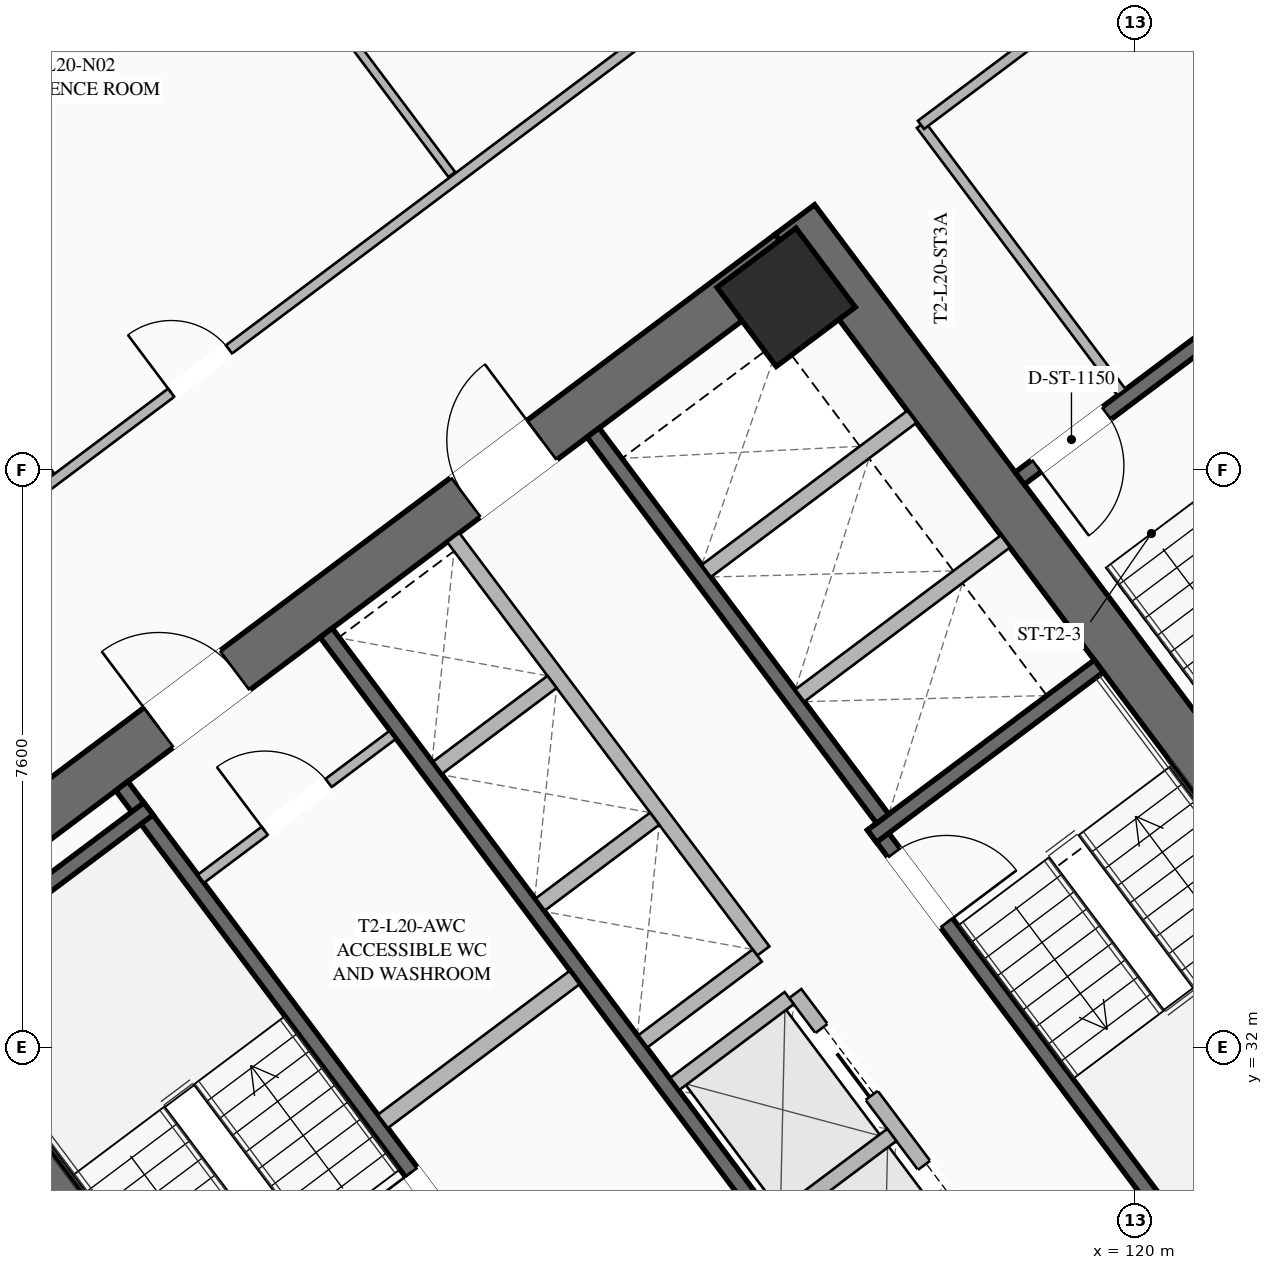
"""IFC4 building model, lengths in metres.
Left out: names, types, materials, properties, quantities, classifications, styles, units other than length and angle.
Written with IfcOpenShell. Run it as: python <this file> out.ifc"""

import sys

from ifc_helpers import new_model, si_unit, direction, frame, frame_2d, origin, origin_2d, place, context, subcontext, project, spatial, rectangle, hollow_rectangle, extrude, element, fill, save


model = new_model("IFC4")
c1 = context("Model", 3, precision=1e-05, world=origin(), true_north=direction((0.0, 1.0)))
c2 = subcontext(c1, "Body", "Model", "MODEL_VIEW")
j1 = project(units=[si_unit("LENGTHUNIT", "METRE"), si_unit("PLANEANGLEUNIT", "RADIAN")], contexts=[c1])
p1 = place(None, origin())
s1 = spatial("IfcSite", under=j1, at=p1, CompositionType="ELEMENT")
p2 = place(p1, origin())
s2 = spatial("IfcBuilding", under=s1, at=p2, CompositionType="ELEMENT")
p3 = place(p2, frame((0.0, 0.0, 77.85)))
s3 = spatial("IfcBuildingStorey", under=s2, at=p3, CompositionType="ELEMENT", Elevation=77.85)
for number, where, z_axis, x_axis in (
    (1, (112.476, 21.107, 0.0), (0.0, 0.0, 1.0), (-0.6, 0.8, 0.0)),
    (2, (115.524, 42.893, 0.0), (0.0, 0.0, 1.0), (0.6, -0.8, 0.0)),
):
    element("IfcWall", number, at=place(p3, frame(where, z_axis=z_axis, x_axis=x_axis)), inside=s3, PredefinedType="SHEAR", context=c2, shape_type="SweptSolid", body=[
        extrude(rectangle(XDim=15.6, YDim=0.65, at=frame_2d((7.8, 0.0))), origin(), (0.0, 0.0, 1.0), 3.55),
    ])
p4 = place(p3, frame((124.429, 30.478, 0.0), z_axis=(0.0, 0.0, 1.0), x_axis=(-0.799998028465, -0.600002628705, 0.0)))
e3 = element("IfcWall", 3, at=p4, inside=s3, PredefinedType="SHEAR", context=c2, shape_type="SweptSolid", body=[
    extrude(rectangle(XDim=14.86, YDim=0.65, at=frame_2d((7.43, 0.0))), origin(), (0.0, 0.0, 1.0), 3.55),
])
p5 = place(p4, frame((9.13, 0.0, 0.0)))
e4 = element("IfcOpeningElement", 4, at=p5, cuts=e3, PredefinedType="OPENING", context=c2, shape_type="SweptSolid", body=[
    extrude(rectangle(XDim=1.25, YDim=2.25, at=frame_2d((0.625, 1.125))), frame((0.0, 0.335, 0.0), z_axis=(0.0, -1.0, 0.0), x_axis=(1.0, 0.0, 0.0)), (0.0, 0.0, 1.0), 0.67),
])
p6 = place(p4, frame((4.08, 0.0, 0.0)))
e5 = element("IfcOpeningElement", 5, at=p6, cuts=e3, PredefinedType="OPENING", context=c2, shape_type="SweptSolid", body=[
    extrude(rectangle(XDim=1.25, YDim=2.25, at=frame_2d((0.625, 1.125))), frame((0.0, 0.335, 0.0), z_axis=(0.0, -1.0, 0.0), x_axis=(1.0, 0.0, 0.0)), (0.0, 0.0, 1.0), 0.67),
])
p7 = place(p3, frame((103.571, 33.522, 0.0), z_axis=(0.0, 0.0, 1.0), x_axis=(0.799998028465, 0.600002628705, 0.0)))
e6 = element("IfcWall", 6, at=p7, inside=s3, PredefinedType="SHEAR", context=c2, shape_type="SweptSolid", body=[
    extrude(rectangle(XDim=14.86, YDim=0.65, at=frame_2d((7.43, 0.0))), origin(), (0.0, 0.0, 1.0), 3.55),
])
p8 = place(p7, frame((4.48, 0.0, 0.0)))
e7 = element("IfcOpeningElement", 7, at=p8, cuts=e6, PredefinedType="OPENING", context=c2, shape_type="SweptSolid", body=[
    extrude(rectangle(XDim=1.25, YDim=2.25, at=frame_2d((0.625, 1.125))), frame((0.0, 0.335, 0.0), z_axis=(0.0, -1.0, 0.0), x_axis=(1.0, 0.0, 0.0)), (0.0, 0.0, 1.0), 0.67),
])
p9 = place(p7, frame((9.53, 0.0, 0.0)))
e8 = element("IfcOpeningElement", 8, at=p9, cuts=e6, PredefinedType="OPENING", context=c2, shape_type="SweptSolid", body=[
    extrude(rectangle(XDim=1.25, YDim=2.25, at=frame_2d((0.625, 1.125))), frame((0.0, 0.335, 0.0), z_axis=(0.0, -1.0, 0.0), x_axis=(1.0, 0.0, 0.0)), (0.0, 0.0, 1.0), 0.67),
])
p10 = place(p3, frame((115.41, 41.87, 0.0), z_axis=(0.0, 0.0, 1.0), x_axis=(0.799999996291, 0.600000004945, 0.0)))
e9 = element("IfcColumn", 9, at=p10, inside=s3, PredefinedType="COLUMN", context=c2, shape_type="SweptSolid", body=[
    extrude(hollow_rectangle(XDim=1.3, YDim=1.3, WallThickness=0.05, at=origin_2d()), origin(), (0.0, 0.0, 1.0), 3.35),
])
p11 = place(p3, frame((111.44, 29.08, 0.0), z_axis=(0.0, 0.0, 1.0), x_axis=(-0.600009827119, 0.799992629566, 0.0)))
e10 = element("IfcWall", 10, at=p11, inside=s3, PredefinedType="SHEAR", context=c2, shape_type="SweptSolid", body=[
    extrude(rectangle(XDim=7.95, YDim=0.2, at=frame_2d((3.975, 0.0))), origin(), (0.0, 0.0, 1.0), 3.35),
])
p12 = place(p11, frame((0.45, 0.0, 0.0)))
e11 = element("IfcOpeningElement", 11, at=p12, cuts=e10, PredefinedType="OPENING", context=c2, shape_type="SweptSolid", body=[
    extrude(rectangle(XDim=1.15, YDim=2.2, at=frame_2d((0.575, 1.1))), frame((0.0, 0.11, 0.0), z_axis=(0.0, -1.0, 0.0), x_axis=(1.0, 0.0, 0.0)), (0.0, 0.0, 1.0), 0.22),
])
p13 = place(p3, frame((104.036, 32.902, 0.0), z_axis=(0.0, 0.0, 1.0), x_axis=(0.800039270442, 0.59994763584, 0.0)))
e12 = element("IfcWall", 12, at=p13, inside=s3, PredefinedType="SHEAR", context=c2, shape_type="SweptSolid", body=[
    extrude(rectangle(XDim=3.73, YDim=0.2, at=frame_2d((1.865, 0.0))), origin(), (0.0, 0.0, 1.0), 3.35),
])
p14 = place(p3, frame((116.56, 34.92, 0.0), z_axis=(0.0, 0.0, 1.0), x_axis=(0.600009827119, -0.799992629566, 0.0)))
e13 = element("IfcWall", 13, at=p14, inside=s3, PredefinedType="SHEAR", context=c2, shape_type="SweptSolid", body=[
    extrude(rectangle(XDim=7.95, YDim=0.2, at=frame_2d((3.975, 0.0))), origin(), (0.0, 0.0, 1.0), 3.35),
])
p15 = place(p14, frame((0.45, 0.0, 0.0)))
e14 = element("IfcOpeningElement", 14, at=p15, cuts=e13, PredefinedType="OPENING", context=c2, shape_type="SweptSolid", body=[
    extrude(rectangle(XDim=1.15, YDim=2.2, at=frame_2d((0.575, 1.1))), frame((0.0, 0.11, 0.0), z_axis=(0.0, -1.0, 0.0), x_axis=(1.0, 0.0, 0.0)), (0.0, 0.0, 1.0), 0.22),
])
p16 = place(p3, frame((116.54, 34.78, 0.0), z_axis=(0.0, 0.0, 1.0), x_axis=(0.799984290658, 0.600020945218, 0.0)))
e15 = element("IfcWall", 15, at=p16, inside=s3, PredefinedType="SHEAR", context=c2, shape_type="SweptSolid", body=[
    extrude(rectangle(XDim=3.73, YDim=0.2, at=frame_2d((1.865, 0.0))), origin(), (0.0, 0.0, 1.0), 3.35),
])
p17 = place(p3, frame((117.938, 26.016, 0.0), z_axis=(0.0, 0.0, 1.0), x_axis=(-0.600005463273, 0.799995902516, 0.0)))
e16 = element("IfcWall", 16, at=p17, inside=s3, PredefinedType="SHEAR", context=c2, shape_type="SweptSolid", body=[
    extrude(rectangle(XDim=14.3, YDim=0.2, at=frame_2d((7.15, 0.0))), origin(), (0.0, 0.0, 1.0), 3.35),
])
p18 = place(p3, frame((110.104, 31.028, 0.0), z_axis=(0.0, 0.0, 1.0), x_axis=(0.800018601094, 0.59997519774, 0.0)))
e17 = element("IfcWall", 17, at=p18, inside=s3, PredefinedType="SOLIDWALL", context=c2, shape_type="SweptSolid", body=[
    extrude(rectangle(XDim=3.15, YDim=0.22, at=frame_2d((1.575, 0.0))), origin(), (0.0, 0.0, 1.0), 2.703),
])
p19 = place(p3, frame((112.87, 40.09, 0.0), z_axis=(0.0, 0.0, 1.0), x_axis=(0.599975393228, -0.800018454488, 0.0)))
e18 = element("IfcWall", 18, at=p19, inside=s3, PredefinedType="SHEAR", context=c2, shape_type="SweptSolid", body=[
    extrude(rectangle(XDim=6.35, YDim=0.2, at=frame_2d((3.175, 0.0))), origin(), (0.0, 0.0, 1.0), 3.35),
])
for number, where, z_axis, x_axis in (
    (19, (115.59, 36.63, 0.0), (0.0, 0.0, 1.0), (0.8, 0.6, 0.0)),
    (20, (114.36, 38.27, 0.0), (0.0, 0.0, 1.0), (0.8, 0.6, 0.0)),
):
    element("IfcWall", number, at=place(p3, frame(where, z_axis=z_axis, x_axis=x_axis)), inside=s3, PredefinedType="SOLIDWALL", context=c2, shape_type="SweptSolid", body=[
        extrude(rectangle(XDim=3.38, YDim=0.2, at=frame_2d((1.69, 0.0))), origin(), (0.0, 0.0, 1.0), 3.35),
    ])
p20 = place(p3, frame((107.71, 34.22, 0.0), z_axis=(0.0, 0.0, 1.0), x_axis=(0.799981399002, 0.60002480053, 0.0)))
e21 = element("IfcWall", 21, at=p20, inside=s3, PredefinedType="PARTITIONING", context=c2, shape_type="SweptSolid", body=[
    extrude(rectangle(XDim=3.15, YDim=0.135, at=frame_2d((1.575, 0.0))), origin(), (0.0, 0.0, 1.0), 2.703),
])
p21 = place(p20, frame((1.05, 0.0, 0.0)))
e22 = element("IfcOpeningElement", 22, at=p21, cuts=e21, PredefinedType="OPENING", context=c2, shape_type="SweptSolid", body=[
    extrude(rectangle(XDim=1.05, YDim=2.2, at=frame_2d((0.525, 1.1))), frame((0.0, 0.077, 0.0), z_axis=(0.0, -1.0, 0.0), x_axis=(1.0, 0.0, 0.0)), (0.0, 0.0, 1.0), 0.155),
])
p22 = place(p3, frame((119.61, 27.27, 0.0), z_axis=(0.0, 0.0, 1.0), x_axis=(-0.600011488909, 0.79999138319, 0.0)))
e23 = element("IfcWall", 23, at=p22, inside=s3, PredefinedType="SOLIDWALL", context=c2, shape_type="SweptSolid", body=[
    extrude(rectangle(XDim=6.8, YDim=0.2, at=frame_2d((3.4, 0.0))), origin(), (0.0, 0.0, 1.0), 3.35),
])
p23 = place(p22, frame((0.625, 0.0, 0.0)))
e24 = element("IfcOpeningElement", 24, at=p23, cuts=e23, PredefinedType="OPENING", context=c2, shape_type="SweptSolid", body=[
    extrude(rectangle(XDim=1.1, YDim=2.2, at=frame_2d((0.55, 1.1))), frame((0.0, 0.11, 0.0), z_axis=(0.0, -1.0, 0.0), x_axis=(1.0, 0.0, 0.0)), (0.0, 0.0, 1.0), 0.22),
])
p24 = place(p22, frame((2.875, 0.0, 0.0)))
e25 = element("IfcOpeningElement", 25, at=p24, cuts=e23, PredefinedType="OPENING", context=c2, shape_type="SweptSolid", body=[
    extrude(rectangle(XDim=1.1, YDim=2.2, at=frame_2d((0.55, 1.1))), frame((0.0, 0.11, 0.0), z_axis=(0.0, -1.0, 0.0), x_axis=(1.0, 0.0, 0.0)), (0.0, 0.0, 1.0), 0.22),
])
p25 = place(p22, frame((5.125, 0.0, 0.0)))
e26 = element("IfcOpeningElement", 26, at=p25, cuts=e23, PredefinedType="OPENING", context=c2, shape_type="SweptSolid", body=[
    extrude(rectangle(XDim=1.1, YDim=2.2, at=frame_2d((0.55, 1.1))), frame((0.0, 0.11, 0.0), z_axis=(0.0, -1.0, 0.0), x_axis=(1.0, 0.0, 0.0)), (0.0, 0.0, 1.0), 0.22),
])
p26 = place(p3, frame((115.296, 29.722, 0.0), z_axis=(0.0, 0.0, 1.0), x_axis=(0.799984418148, 0.600020775241, 0.0)))
e27 = element("IfcWall", 27, at=p26, inside=s3, PredefinedType="SOLIDWALL", context=c2, shape_type="SweptSolid", body=[
    extrude(rectangle(XDim=1.88, YDim=0.2, at=frame_2d((0.94, 0.0))), origin(), (0.0, 0.0, 1.0), 3.35),
])
p27 = place(p3, frame((113.946, 31.522, 0.0), z_axis=(0.0, 0.0, 1.0), x_axis=(0.8, 0.6, 0.0)))
e28 = element("IfcWall", 28, at=p27, inside=s3, PredefinedType="SOLIDWALL", context=c2, shape_type="SweptSolid", body=[
    extrude(rectangle(XDim=1.88, YDim=0.2, at=frame_2d((0.94, 0.0))), origin(), (0.0, 0.0, 1.0), 3.35),
])
p28 = place(p3, frame((115.11, 33.27, 0.0), z_axis=(0.0, 0.0, 1.0), x_axis=(-0.600011488909, 0.79999138319, 0.0)))
e29 = element("IfcWall", 29, at=p28, inside=s3, PredefinedType="SOLIDWALL", context=c2, shape_type="SweptSolid", body=[
    extrude(rectangle(XDim=6.8, YDim=0.2, at=frame_2d((3.4, 0.0))), origin(), (0.0, 0.0, 1.0), 3.35),
])
p29 = place(p3, frame((113.526, 32.082, 0.0), z_axis=(0.0, 0.0, 1.0), x_axis=(0.800046745961, 0.599937666993, 0.0)))
e30 = element("IfcWall", 30, at=p29, inside=s3, PredefinedType="SOLIDWALL", context=c2, shape_type="SweptSolid", body=[
    extrude(rectangle(XDim=1.88, YDim=0.2, at=frame_2d((0.94, 0.0))), origin(), (0.0, 0.0, 1.0), 3.35),
])
p30 = place(p3, frame((112.176, 33.882, 0.0), z_axis=(0.0, 0.0, 1.0), x_axis=(0.8, 0.6, 0.0)))
e31 = element("IfcWall", 31, at=p30, inside=s3, PredefinedType="SOLIDWALL", context=c2, shape_type="SweptSolid", body=[
    extrude(rectangle(XDim=1.88, YDim=0.2, at=frame_2d((0.94, 0.0))), origin(), (0.0, 0.0, 1.0), 3.35),
])
p31 = place(p3, frame((110.826, 35.682, 0.0), z_axis=(0.0, 0.0, 1.0), x_axis=(0.799984418148, 0.600020775241, 0.0)))
e32 = element("IfcWall", 32, at=p31, inside=s3, PredefinedType="SOLIDWALL", context=c2, shape_type="SweptSolid", body=[
    extrude(rectangle(XDim=1.88, YDim=0.2, at=frame_2d((0.94, 0.0))), origin(), (0.0, 0.0, 1.0), 3.35),
])
p32 = place(p3, frame((121.204, 41.528, 0.0), z_axis=(0.0, 0.0, 1.0), x_axis=(-0.800017232136, -0.599977023131, 0.0)))
e33 = element("IfcWall", 33, at=p32, inside=s3, PredefinedType="SHEAR", context=c2, shape_type="SweptSolid", body=[
    extrude(rectangle(XDim=3.4, YDim=0.2, at=frame_2d((1.7, 0.0))), origin(), (0.0, 0.0, 1.0), 3.35),
])
p33 = place(p32, frame((1.975, 0.0, 0.0)))
e34 = element("IfcOpeningElement", 34, at=p33, cuts=e33, PredefinedType="OPENING", context=c2, shape_type="SweptSolid", body=[
    extrude(rectangle(XDim=1.15, YDim=2.2, at=frame_2d((0.575, 1.1))), frame((0.0, 0.11, 0.0), z_axis=(0.0, -1.0, 0.0), x_axis=(1.0, 0.0, 0.0)), (0.0, 0.0, 1.0), 0.22),
])
p34 = place(p3, frame((119.824, 40.618, 0.0), z_axis=(0.0, 0.0, 1.0), x_axis=(-0.599982243973, 0.800013316712, 0.0)))
e35 = element("IfcWall", 35, at=p34, inside=s3, PredefinedType="PARTITIONING", context=c2, shape_type="SweptSolid", body=[
    extrude(rectangle(XDim=4.4, YDim=0.135, at=frame_2d((2.2, 0.0))), origin(), (0.0, 0.0, 1.0), 2.703),
])
p35 = place(p3, frame((98.516, 34.012, 0.0), z_axis=(0.0, 0.0, 1.0), x_axis=(0.8, 0.6, 0.0)))
e36 = element("IfcWall", 36, at=p35, inside=s3, PredefinedType="PARTITIONING", context=c2, shape_type="SweptSolid", body=[
    extrude(rectangle(XDim=28.23, YDim=0.135, at=frame_2d((14.115, 0.0))), origin(), (0.0, 0.0, 1.0), 2.703),
])
p36 = place(p35, frame((0.3, 0.0, 0.0)))
e37 = element("IfcOpeningElement", 37, at=p36, cuts=e36, PredefinedType="OPENING", context=c2, shape_type="SweptSolid", body=[
    extrude(rectangle(XDim=0.95, YDim=2.05, at=frame_2d((0.475, 1.025))), frame((0.0, 0.077, 0.0), z_axis=(0.0, -1.0, 0.0), x_axis=(1.0, 0.0, 0.0)), (0.0, 0.0, 1.0), 0.155),
])
p37 = place(p35, frame((11.004, 0.0, 0.0)))
e38 = element("IfcOpeningElement", 38, at=p37, cuts=e36, PredefinedType="OPENING", context=c2, shape_type="SweptSolid", body=[
    extrude(rectangle(XDim=0.95, YDim=2.05, at=frame_2d((0.475, 1.025))), frame((0.0, 0.077, 0.0), z_axis=(0.0, -1.0, 0.0), x_axis=(1.0, 0.0, 0.0)), (0.0, 0.0, 1.0), 0.155),
])
p38 = place(p35, frame((26.98, 0.0, 0.0)))
e39 = element("IfcOpeningElement", 39, at=p38, cuts=e36, PredefinedType="OPENING", context=c2, shape_type="SweptSolid", body=[
    extrude(rectangle(XDim=0.95, YDim=2.05, at=frame_2d((0.475, 1.025))), frame((0.0, 0.077, 0.0), z_axis=(0.0, -1.0, 0.0), x_axis=(1.0, 0.0, 0.0)), (0.0, 0.0, 1.0), 0.155),
])
for number, where, z_axis, x_axis in (
    (40, (105.732, 39.524, 0.0), (0.0, 0.0, 1.0), (-0.6, 0.8, 0.0)),
    (41, (111.012, 43.484, 0.0), (0.0, 0.0, 1.0), (-0.6, 0.8, 0.0)),
):
    element("IfcWall", number, at=place(p3, frame(where, z_axis=z_axis, x_axis=x_axis)), inside=s3, PredefinedType="PARTITIONING", context=c2, shape_type="SweptSolid", body=[
        extrude(rectangle(XDim=8.9, YDim=0.11, at=frame_2d((4.45, 0.0))), origin(), (0.0, 0.0, 1.0), 2.703),
    ])
p39 = place(p3, frame((134.18, 33.51, 0.0), z_axis=(0.0, 0.0, 1.0), x_axis=(-0.8, -0.6, 0.0)))
e42 = element("IfcWall", 42, at=p39, inside=s3, PredefinedType="PARTITIONING", context=c2, shape_type="SweptSolid", body=[
    extrude(rectangle(XDim=28.23, YDim=0.135, at=frame_2d((14.115, 0.0))), origin(), (0.0, 0.0, 1.0), 2.703),
])
p40 = place(p39, frame((26.9, 0.0, 0.0)))
e43 = element("IfcOpeningElement", 43, at=p40, cuts=e42, PredefinedType="OPENING", context=c2, shape_type="SweptSolid", body=[
    extrude(rectangle(XDim=0.95, YDim=2.05, at=frame_2d((0.475, 1.025))), frame((0.0, 0.077, 0.0), z_axis=(0.0, -1.0, 0.0), x_axis=(1.0, 0.0, 0.0)), (0.0, 0.0, 1.0), 0.155),
])
p41 = place(p39, frame((16.453, 0.0, 0.0)))
e44 = element("IfcOpeningElement", 44, at=p41, cuts=e42, PredefinedType="OPENING", context=c2, shape_type="SweptSolid", body=[
    extrude(rectangle(XDim=0.95, YDim=2.05, at=frame_2d((0.475, 1.025))), frame((0.0, 0.077, 0.0), z_axis=(0.0, -1.0, 0.0), x_axis=(1.0, 0.0, 0.0)), (0.0, 0.0, 1.0), 0.155),
])
p42 = place(p39, frame((0.38, 0.0, 0.0)))
e45 = element("IfcOpeningElement", 45, at=p42, cuts=e42, PredefinedType="OPENING", context=c2, shape_type="SweptSolid", body=[
    extrude(rectangle(XDim=0.95, YDim=2.05, at=frame_2d((0.475, 1.025))), frame((0.0, 0.077, 0.0), z_axis=(0.0, -1.0, 0.0), x_axis=(1.0, 0.0, 0.0)), (0.0, 0.0, 1.0), 0.155),
])
p43 = place(p3, frame((125.224, 50.168, 0.0), z_axis=(0.0, 0.0, 1.0), x_axis=(-0.8, -0.6, 0.0)))
e46 = element("IfcWall", 46, at=p43, inside=s3, PredefinedType="PARTITIONING", context=c2, shape_type="SweptSolid", body=[
    extrude(rectangle(XDim=10.05, YDim=0.135, at=frame_2d((5.025, 0.0))), origin(), (0.0, 0.0, 1.0), 2.703),
])
p44 = place(p43, frame((4.9, 0.0, 0.0)))
e47 = element("IfcOpeningElement", 47, at=p44, cuts=e46, PredefinedType="OPENING", context=c2, shape_type="SweptSolid", body=[
    extrude(rectangle(XDim=0.95, YDim=2.05, at=frame_2d((0.475, 1.025))), frame((0.0, 0.077, 0.0), z_axis=(0.0, -1.0, 0.0), x_axis=(1.0, 0.0, 0.0)), (0.0, 0.0, 1.0), 0.155),
])
p45 = place(p3, frame((111.548, 16.636, 0.0), z_axis=(0.0, 0.0, 1.0), x_axis=(-0.600003610192, 0.799997292343, 0.0)))
e48 = element("IfcWall", 48, at=p45, inside=s3, PredefinedType="PARTITIONING", context=c2, shape_type="SweptSolid", body=[
    extrude(rectangle(XDim=21.64, YDim=0.135, at=frame_2d((10.82, 0.0))), origin(), (0.0, 0.0, 1.0), 2.703),
])
p46 = place(p45, frame((0.3, 0.0, 0.0)))
e49 = element("IfcOpeningElement", 49, at=p46, cuts=e48, PredefinedType="OPENING", context=c2, shape_type="SweptSolid", body=[
    extrude(rectangle(XDim=0.95, YDim=2.05, at=frame_2d((0.475, 1.025))), frame((0.0, 0.077, 0.0), z_axis=(0.0, -1.0, 0.0), x_axis=(1.0, 0.0, 0.0)), (0.0, 0.0, 1.0), 0.155),
])
p47 = place(p8, origin())
e50 = element("IfcDoor", 50, at=p47, inside=s3, OperationType="SINGLE_SWING_LEFT", PredefinedType="DOOR", context=c2, shape_type="SweptSolid", body=[
    extrude(rectangle(XDim=1.25, YDim=2.25, at=frame_2d((0.625, 1.125))), frame((0.0, 0.025, 0.0), z_axis=(0.0, -1.0, 0.0), x_axis=(1.0, 0.0, 0.0)), (0.0, 0.0, 1.0), 0.05),
])
fill(e7, e50)
p48 = place(p9, origin())
e51 = element("IfcDoor", 51, at=p48, inside=s3, OperationType="SINGLE_SWING_RIGHT", PredefinedType="DOOR", context=c2, shape_type="SweptSolid", body=[
    extrude(rectangle(XDim=1.25, YDim=2.25, at=frame_2d((0.625, 1.125))), frame((0.0, 0.025, 0.0), z_axis=(0.0, -1.0, 0.0), x_axis=(1.0, 0.0, 0.0)), (0.0, 0.0, 1.0), 0.05),
])
fill(e8, e51)
p49 = place(p12, origin())
e52 = element("IfcDoor", 52, at=p49, inside=s3, OperationType="SINGLE_SWING_RIGHT", PredefinedType="DOOR", context=c2, shape_type="SweptSolid", body=[
    extrude(rectangle(XDim=1.15, YDim=2.2, at=frame_2d((0.575, 1.1))), frame((0.0, 0.025, 0.0), z_axis=(0.0, -1.0, 0.0), x_axis=(1.0, 0.0, 0.0)), (0.0, 0.0, 1.0), 0.05),
])
fill(e11, e52)
p50 = place(p15, origin())
e53 = element("IfcDoor", 53, at=p50, inside=s3, OperationType="SINGLE_SWING_RIGHT", PredefinedType="DOOR", context=c2, shape_type="SweptSolid", body=[
    extrude(rectangle(XDim=1.15, YDim=2.2, at=frame_2d((0.575, 1.1))), frame((0.0, 0.025, 0.0), z_axis=(0.0, -1.0, 0.0), x_axis=(1.0, 0.0, 0.0)), (0.0, 0.0, 1.0), 0.05),
])
fill(e14, e53)
p51 = place(p21, origin())
e54 = element("IfcDoor", 54, at=p51, inside=s3, OperationType="SINGLE_SWING_LEFT", PredefinedType="DOOR", context=c2, shape_type="SweptSolid", body=[
    extrude(rectangle(XDim=1.05, YDim=2.2, at=frame_2d((0.525, 1.1))), frame((0.0, 0.025, 0.0), z_axis=(0.0, -1.0, 0.0), x_axis=(1.0, 0.0, 0.0)), (0.0, 0.0, 1.0), 0.05),
])
fill(e22, e54)
p52 = place(p33, origin())
e55 = element("IfcDoor", 55, at=p52, inside=s3, OperationType="SINGLE_SWING_RIGHT", PredefinedType="DOOR", context=c2, shape_type="SweptSolid", body=[
    extrude(rectangle(XDim=1.15, YDim=2.2, at=frame_2d((0.575, 1.1))), frame((0.0, 0.025, 0.0), z_axis=(0.0, -1.0, 0.0), x_axis=(1.0, 0.0, 0.0)), (0.0, 0.0, 1.0), 0.05),
])
fill(e34, e55)
p53 = place(p37, origin())
e56 = element("IfcDoor", 56, at=p53, inside=s3, OperationType="SINGLE_SWING_LEFT", PredefinedType="DOOR", context=c2, shape_type="SweptSolid", body=[
    extrude(rectangle(XDim=0.95, YDim=2.05, at=frame_2d((0.475, 1.025))), frame((0.0, 0.025, 0.0), z_axis=(0.0, -1.0, 0.0), x_axis=(1.0, 0.0, 0.0)), (0.0, 0.0, 1.0), 0.05),
])
fill(e38, e56)
p54 = place(p24, origin())
e57 = element("IfcDoor", 57, at=p54, inside=s3, OperationType="SLIDING_TO_LEFT", PredefinedType="DOOR", context=c2, shape_type="SweptSolid", body=[
    extrude(rectangle(XDim=1.1, YDim=2.2, at=frame_2d((0.55, 1.1))), frame((0.0, 0.025, 0.0), z_axis=(0.0, -1.0, 0.0), x_axis=(1.0, 0.0, 0.0)), (0.0, 0.0, 1.0), 0.05),
])
fill(e25, e57)
p55 = place(p25, origin())
e58 = element("IfcDoor", 58, at=p55, inside=s3, OperationType="SLIDING_TO_LEFT", PredefinedType="DOOR", context=c2, shape_type="SweptSolid", body=[
    extrude(rectangle(XDim=1.1, YDim=2.2, at=frame_2d((0.55, 1.1))), frame((0.0, 0.025, 0.0), z_axis=(0.0, -1.0, 0.0), x_axis=(1.0, 0.0, 0.0)), (0.0, 0.0, 1.0), 0.05),
])
fill(e26, e58)
save(model, sys.argv[1])
